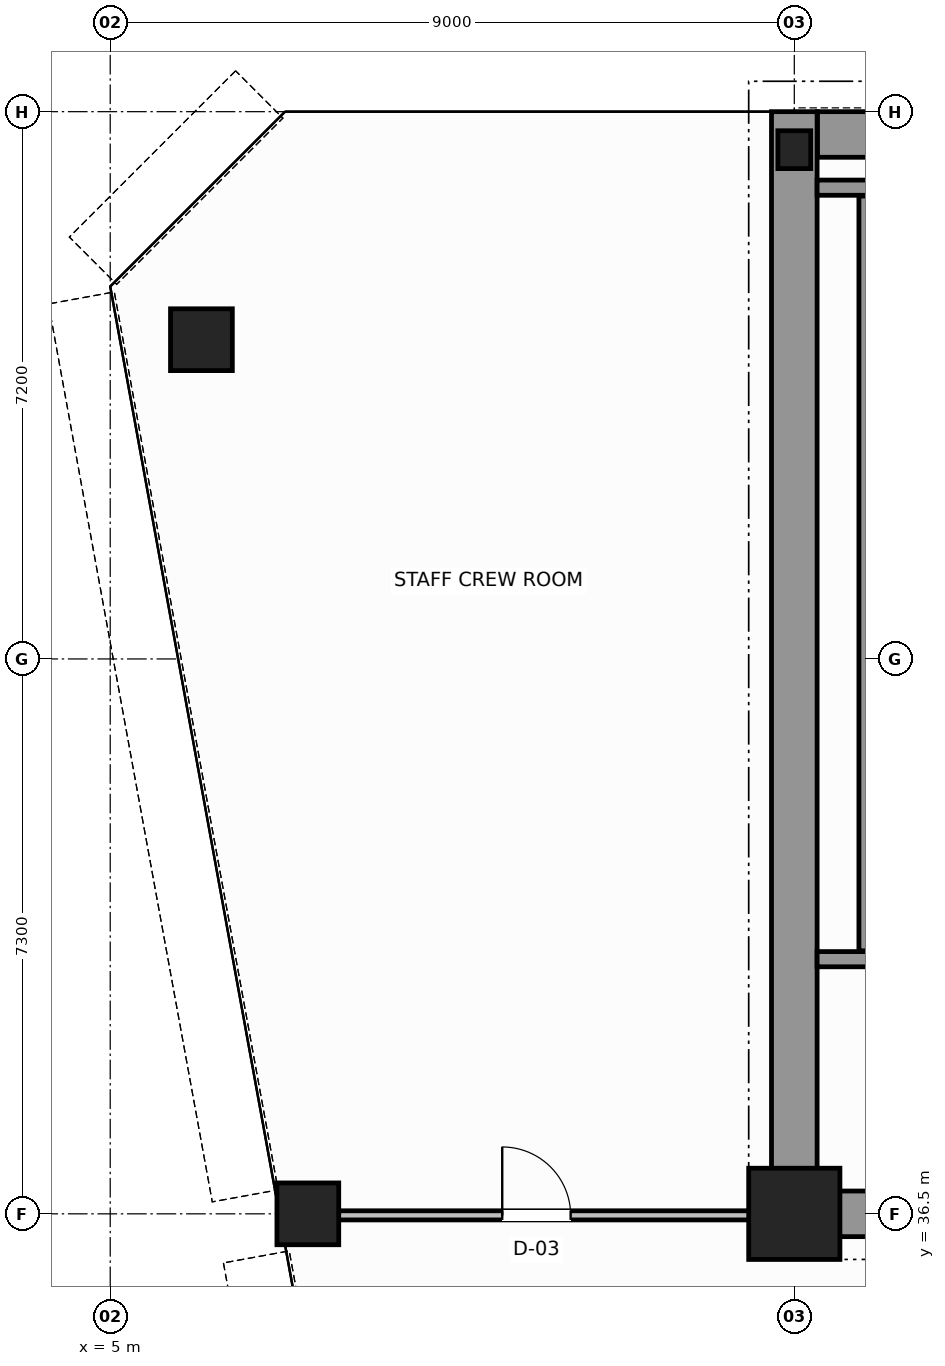
"""IFC4 building model, lengths in metres.
Left out: names, types, materials, properties, quantities, classifications, styles, units other than length and angle.
Written with IfcOpenShell. Run it as: python <this file> out.ifc"""

import sys

from ifc_helpers import new_model, si_unit, direction, frame, frame_2d, origin, origin_2d, place, context, subcontext, project, spatial, rectangle, hollow_circle, i_section, extrude, source, transform, mapped, element, fill, save


model = new_model("IFC4")
c1 = context("Model", 3, precision=1e-05, world=origin(), true_north=direction((0.0, 1.0)))
c2 = subcontext(c1, "Body", "Model", "MODEL_VIEW")
j1 = project(units=[si_unit("LENGTHUNIT", "METRE"), si_unit("PLANEANGLEUNIT", "RADIAN")], contexts=[c1])
p1 = place(None, origin())
s1 = spatial("IfcSite", under=j1, at=p1, CompositionType="ELEMENT")
p2 = place(p1, origin())
s2 = spatial("IfcBuilding", under=s1, at=p2, CompositionType="ELEMENT")
p3 = place(p2, frame((0.0, 0.0, 176.6)))
s3 = spatial("IfcBuildingStorey", under=s2, at=p3, CompositionType="ELEMENT", Elevation=176.6)
m1 = source(origin(), c2, "Body", "SweptSolid", [
    extrude(rectangle(XDim=1.2, YDim=1.2, at=origin_2d()), origin(), (0.0, 0.0, 1.0), 3.8),
])
p4 = place(p3, frame((14.0, 36.5, 0.0), z_axis=(0.0, 0.0, 1.0), x_axis=(1.0, 0.0, 0.0)))
e1 = element("IfcColumn", 1, at=p4, inside=s3, PredefinedType="COLUMN", context=c2, shape_type="MappedRepresentation", body=[
    mapped(m1, transform((0.0, 0.0, 0.0), scale=1.0)),
])
m2 = source(origin(), c2, "Body", "SweptSolid", [
    extrude(i_section(OverallWidth=0.432, OverallDepth=0.498, WebThickness=0.055, FlangeThickness=0.068, FilletRadius=0.015, at=origin_2d()), origin(), (0.0, 0.0, 1.0), 3.8),
])
p5 = place(p3, frame((14.0, 50.5, 0.0), z_axis=(0.0, 0.0, 1.0), x_axis=(1.0, 0.0, 0.0)))
e2 = element("IfcColumn", 2, at=p5, inside=s3, PredefinedType="COLUMN", context=c2, shape_type="MappedRepresentation", body=[
    mapped(m2, transform((0.0, 0.0, 0.0), scale=1.0)),
])
m3 = source(origin(), c2, "Body", "SweptSolid", [
    extrude(hollow_circle(Radius=0.406, WallThickness=0.04, at=origin_2d()), origin(), (0.0, 0.0, 1.0), 3.8),
])
for number, where, z_axis, x_axis in (
    (3, (6.2, 48.0, 0.0), (0.0, 0.0, 1.0), (1.0, 0.0, 0.0)),
    (4, (7.6, 36.5, 0.0), (0.0, 0.0, 1.0), (1.0, 0.0, 0.0)),
):
    element("IfcColumn", number, at=place(p3, frame(where, z_axis=z_axis, x_axis=x_axis)), inside=s3, PredefinedType="COLUMN", context=c2, shape_type="MappedRepresentation", body=[
        mapped(m3, transform((0.0, 0.0, 0.0), scale=1.0)),
    ])
p6 = place(p3, frame((14.304, 50.7, 0.0), z_axis=(0.0, 0.0, 1.0), x_axis=(1.0, 0.0, 0.0)))
e5 = element("IfcWall", 5, at=p6, inside=s3, PredefinedType="SHEAR", context=c2, shape_type="SweptSolid", body=[
    extrude(rectangle(XDim=19.694, YDim=0.6, at=frame_2d((9.847, 0.0))), origin(), (0.0, 0.0, 1.0), 3.8),
])
p7 = place(p3, frame((14.0, 36.5, 0.0), z_axis=(0.0, 0.0, 1.0), x_axis=(0.0, 1.0, 0.0)))
e6 = element("IfcWall", 6, at=p7, inside=s3, PredefinedType="SHEAR", context=c2, shape_type="SweptSolid", body=[
    extrude(rectangle(XDim=14.5, YDim=0.6, at=frame_2d((7.25, 0.0))), origin(), (0.0, 0.0, 1.0), 3.8),
])
p8 = place(p3, frame((14.32, 36.5, 0.0), z_axis=(0.0, 0.0, 1.0), x_axis=(1.0, 0.0, 0.0)))
e7 = element("IfcWall", 7, at=p8, inside=s3, PredefinedType="SHEAR", context=c2, shape_type="SweptSolid", body=[
    extrude(rectangle(XDim=3.88, YDim=0.6, at=frame_2d((1.94, 0.0))), origin(), (0.0, 0.0, 1.0), 2.58),
])
p9 = place(p3, frame((14.3, 39.85, 0.0), z_axis=(0.0, 0.0, 1.0), x_axis=(1.0, 0.0, 0.0)))
e8 = element("IfcWall", 8, at=p9, inside=s3, PredefinedType="SOLIDWALL", context=c2, shape_type="SweptSolid", body=[
    extrude(rectangle(XDim=4.3, YDim=0.2, at=frame_2d((2.15, 0.0))), origin(), (0.0, 0.0, 1.0), 3.8),
])
p10 = place(p9, frame((1.875, 0.0, 0.0)))
e9 = element("IfcOpeningElement", 9, at=p10, cuts=e8, PredefinedType="OPENING", context=c2, shape_type="SweptSolid", body=[
    extrude(rectangle(XDim=1.1, YDim=2.15, at=frame_2d((0.55, 1.075))), frame((0.0, 0.11, 0.0), z_axis=(0.0, -1.0, 0.0), x_axis=(1.0, 0.0, 0.0)), (0.0, 0.0, 1.0), 0.22),
])
p11 = place(p3, frame((14.3, 50.0, 0.0), z_axis=(0.0, 0.0, 1.0), x_axis=(1.0, 0.0, 0.0)))
e10 = element("IfcWall", 10, at=p11, inside=s3, PredefinedType="SOLIDWALL", context=c2, shape_type="SweptSolid", body=[
    extrude(rectangle(XDim=4.3, YDim=0.2, at=frame_2d((2.15, 0.0))), origin(), (0.0, 0.0, 1.0), 3.8),
])
p12 = place(p3, frame((14.95, 39.96, 0.0), z_axis=(0.0, 0.0, 1.0), x_axis=(0.0, 1.0, 0.0)))
e11 = element("IfcWall", 11, at=p12, inside=s3, PredefinedType="SOLIDWALL", context=c2, shape_type="SweptSolid", body=[
    extrude(rectangle(XDim=9.93, YDim=0.2, at=frame_2d((4.965, 0.0))), origin(), (0.0, 0.0, 1.0), 3.8),
])
p13 = place(p3, frame((7.274, 36.48, 0.0), z_axis=(0.0, 0.0, 1.0), x_axis=(1.0, 0.0, 0.0)))
e12 = element("IfcWall", 12, at=p13, inside=s3, PredefinedType="PARTITIONING", context=c2, shape_type="SweptSolid", body=[
    extrude(rectangle(XDim=6.666, YDim=0.12, at=frame_2d((3.333, 0.0))), origin(), (0.0, 0.0, 1.0), 2.37),
])
p14 = place(p13, frame((2.883, 0.0, 0.0)))
e13 = element("IfcOpeningElement", 13, at=p14, cuts=e12, PredefinedType="OPENING", context=c2, shape_type="SweptSolid", body=[
    extrude(rectangle(XDim=0.9, YDim=2.15, at=frame_2d((0.45, 1.075))), frame((0.0, 0.07, 0.0), z_axis=(0.0, -1.0, 0.0), x_axis=(1.0, 0.0, 0.0)), (0.0, 0.0, 1.0), 0.14),
])
m4 = source(origin(), c2, "Body", "SweptSolid", [
    extrude(rectangle(XDim=0.9, YDim=2.15, at=frame_2d((0.45, 1.075))), frame((0.0, 0.025, 0.0), z_axis=(0.0, -1.0, 0.0), x_axis=(1.0, 0.0, 0.0)), (0.0, 0.0, 1.0), 0.05),
])
p15 = place(p14, origin())
e14 = element("IfcDoor", 14, at=p15, inside=s3, OperationType="SINGLE_SWING_LEFT", PredefinedType="DOOR", context=c2, shape_type="MappedRepresentation", body=[
    mapped(m4, transform((0.0, 0.0, 0.0), scale=1.0)),
])
fill(e13, e14)
save(model, sys.argv[1])
